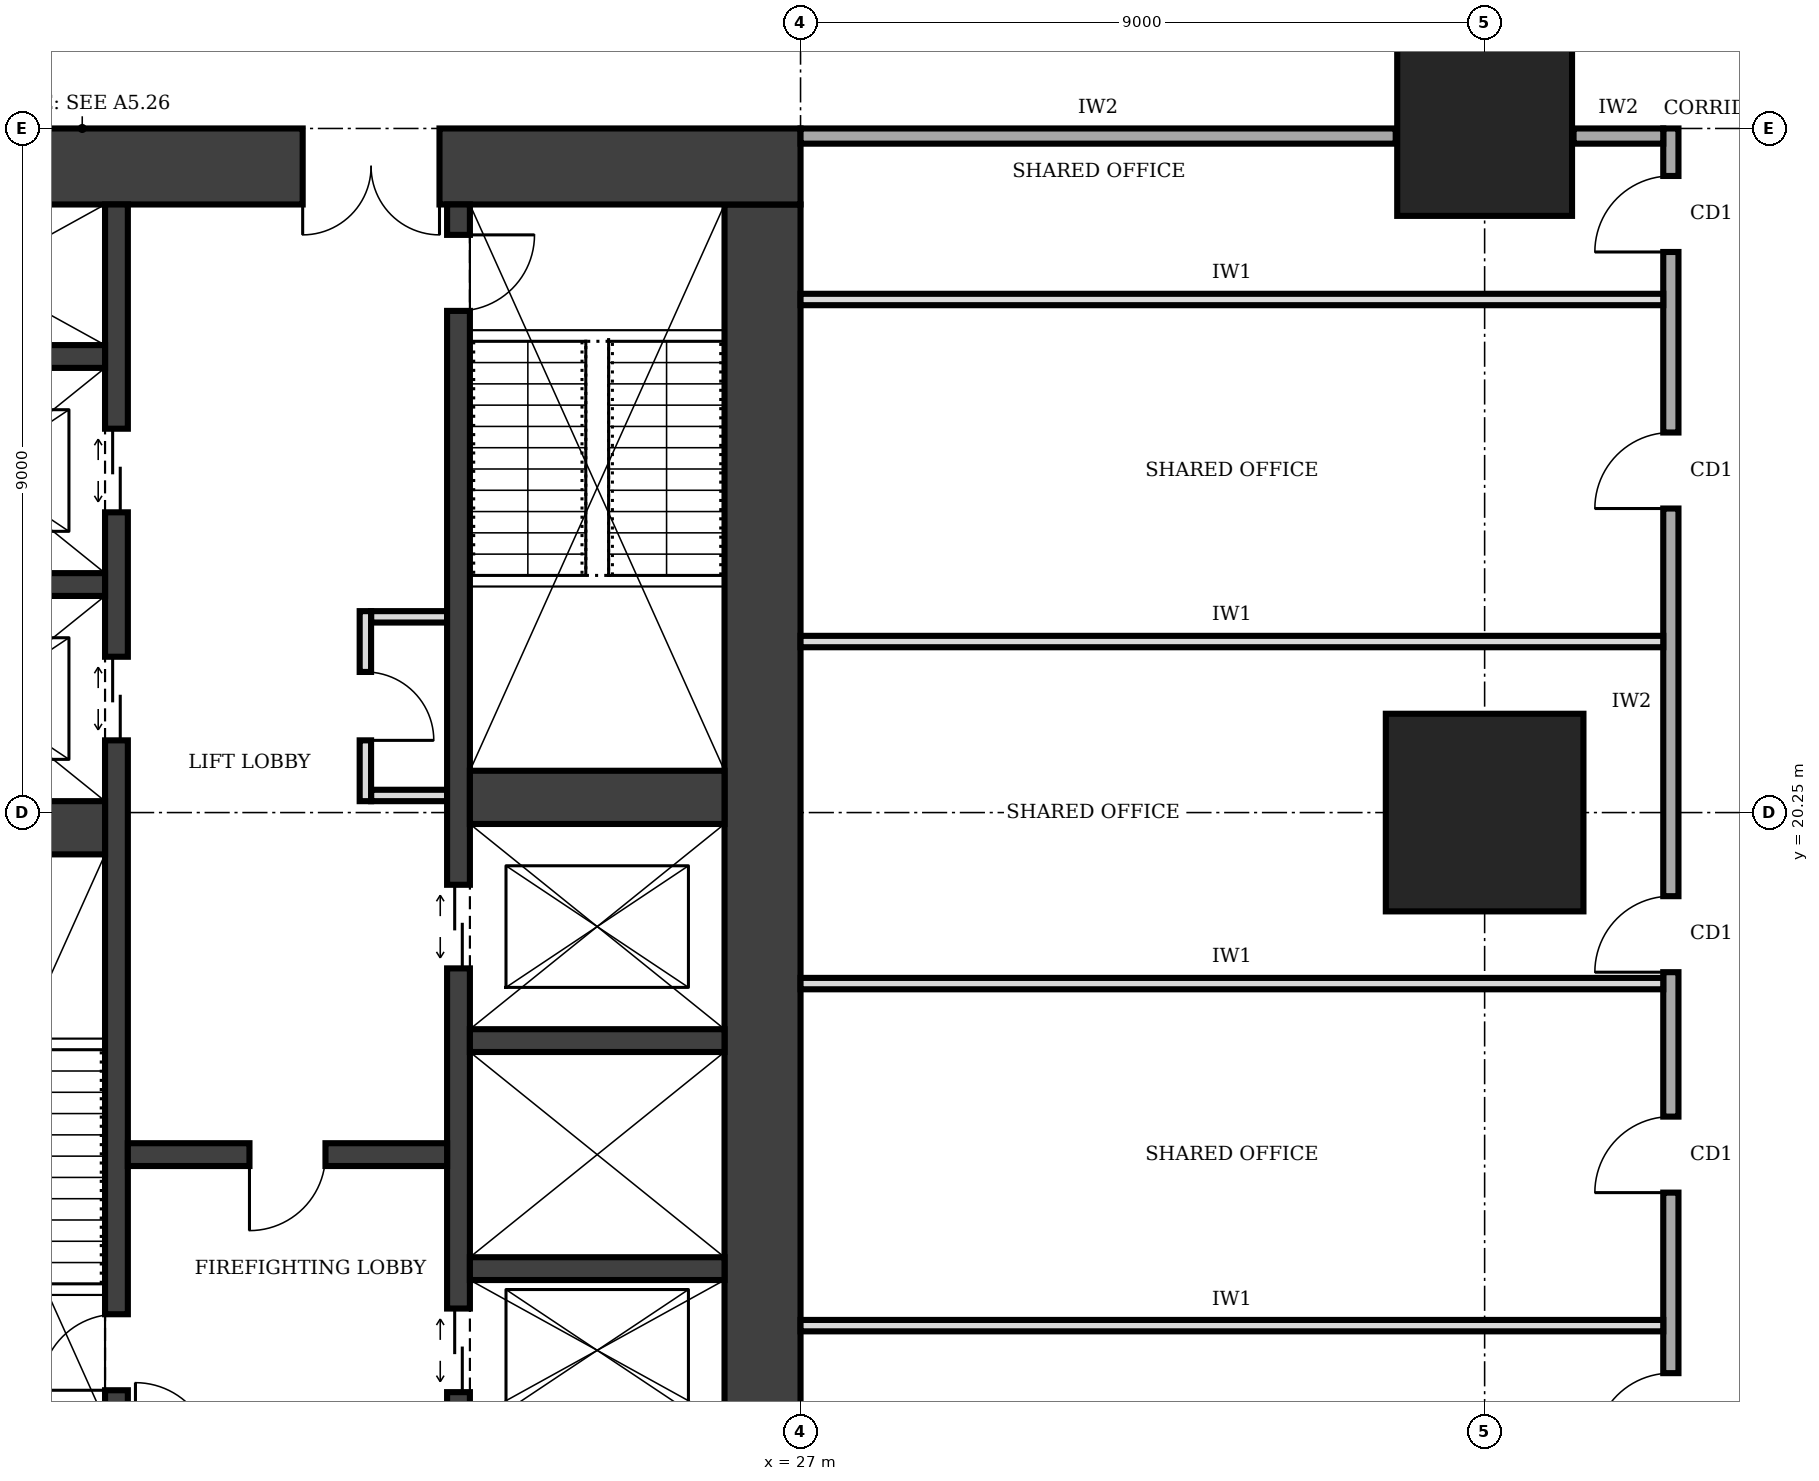
"""IFC4 building model, lengths in metres.
Left out: names, types, materials, properties, quantities, classifications, styles, units other than length and angle.
Written with IfcOpenShell. Run it as: python <this file> out.ifc"""

import sys

from ifc_helpers import new_model, si_unit, direction, frame, frame_2d, origin, origin_2d, place, context, subcontext, project, spatial, rectangle, extrude, element, fill, save


model = new_model("IFC4")
c1 = context("Model", 3, precision=1e-05, world=origin(), true_north=direction((0.0, 1.0)))
c2 = subcontext(c1, "Body", "Model", "MODEL_VIEW")
j1 = project(units=[si_unit("LENGTHUNIT", "METRE"), si_unit("PLANEANGLEUNIT", "RADIAN")], contexts=[c1])
p1 = place(None, origin())
s1 = spatial("IfcSite", under=j1, at=p1, CompositionType="ELEMENT")
p2 = place(p1, origin())
s2 = spatial("IfcBuilding", under=s1, at=p2, CompositionType="ELEMENT")
p3 = place(p2, frame((0.0, 0.0, 89.0)))
s3 = spatial("IfcBuildingStorey", under=s2, at=p3, CompositionType="ELEMENT", Elevation=89.0)
p4 = place(p3, frame((26.5, 12.25, 0.0), z_axis=(0.0, 0.0, 1.0), x_axis=(0.0, 1.0, 0.0)))
e1 = element("IfcWall", 1, at=p4, inside=s3, PredefinedType="SHEAR", context=c2, shape_type="SweptSolid", body=[
    extrude(rectangle(XDim=16.0, YDim=1.0, at=frame_2d((8.0, 0.0))), origin(), (0.0, 0.0, 1.0), 4.0),
])
p5 = place(p3, frame((27.0, 28.75, 0.0), z_axis=(0.0, 0.0, 1.0), x_axis=(-1.0, 0.0, 0.0)))
e2 = element("IfcWall", 2, at=p5, inside=s3, PredefinedType="SHEAR", context=c2, shape_type="SweptSolid", body=[
    extrude(rectangle(XDim=13.5, YDim=1.0, at=frame_2d((6.75, 0.0))), origin(), (0.0, 0.0, 1.0), 4.0),
])
p6 = place(p5, frame((4.75, 0.0, 0.0)))
e3 = element("IfcOpeningElement", 3, at=p6, cuts=e2, PredefinedType="OPENING", context=c2, shape_type="SweptSolid", body=[
    extrude(rectangle(XDim=1.8, YDim=2.1, at=frame_2d((0.9, 1.05))), frame((0.0, 0.51, 0.0), z_axis=(0.0, -1.0, 0.0), x_axis=(1.0, 0.0, 0.0)), (0.0, 0.0, 1.0), 1.02),
])
p7 = place(p3, frame((18.0, 12.25, 0.0), z_axis=(0.0, 0.0, 1.0), x_axis=(0.0, 1.0, 0.0)))
e4 = element("IfcWall", 4, at=p7, inside=s3, PredefinedType="SHEAR", context=c2, shape_type="SweptSolid", body=[
    extrude(rectangle(XDim=16.0, YDim=0.3, at=frame_2d((8.0, 0.0))), origin(), (0.0, 0.0, 1.0), 4.0),
])
p8 = place(p7, frame((0.4, 0.0, 0.0)))
e5 = element("IfcOpeningElement", 5, at=p8, cuts=e4, PredefinedType="OPENING", context=c2, shape_type="SweptSolid", body=[
    extrude(rectangle(XDim=1.0, YDim=2.1, at=frame_2d((0.5, 1.05))), frame((0.0, 0.16, 0.0), z_axis=(0.0, -1.0, 0.0), x_axis=(1.0, 0.0, 0.0)), (0.0, 0.0, 1.0), 0.32),
])
p9 = place(p7, frame((8.95, 0.0, 0.0)))
e6 = element("IfcOpeningElement", 6, at=p9, cuts=e4, PredefinedType="OPENING", context=c2, shape_type="SweptSolid", body=[
    extrude(rectangle(XDim=1.1, YDim=2.1, at=frame_2d((0.55, 1.05))), frame((0.0, 0.16, 0.0), z_axis=(0.0, -1.0, 0.0), x_axis=(1.0, 0.0, 0.0)), (0.0, 0.0, 1.0), 0.32),
])
p10 = place(p7, frame((11.95, 0.0, 0.0)))
e7 = element("IfcOpeningElement", 7, at=p10, cuts=e4, PredefinedType="OPENING", context=c2, shape_type="SweptSolid", body=[
    extrude(rectangle(XDim=1.1, YDim=2.1, at=frame_2d((0.55, 1.05))), frame((0.0, 0.16, 0.0), z_axis=(0.0, -1.0, 0.0), x_axis=(1.0, 0.0, 0.0)), (0.0, 0.0, 1.0), 0.32),
])
p11 = place(p3, frame((22.5, 12.25, 0.0), z_axis=(0.0, 0.0, 1.0), x_axis=(0.0, 1.0, 0.0)))
e8 = element("IfcWall", 8, at=p11, inside=s3, PredefinedType="SHEAR", context=c2, shape_type="SweptSolid", body=[
    extrude(rectangle(XDim=16.0, YDim=0.3, at=frame_2d((8.0, 0.0))), origin(), (0.0, 0.0, 1.0), 4.0),
])
p12 = place(p11, frame((14.6, 0.0, 0.0)))
e9 = element("IfcOpeningElement", 9, at=p12, cuts=e8, PredefinedType="OPENING", context=c2, shape_type="SweptSolid", body=[
    extrude(rectangle(XDim=1.0, YDim=2.1, at=frame_2d((0.5, 1.05))), frame((0.0, 0.16, 0.0), z_axis=(0.0, -1.0, 0.0), x_axis=(1.0, 0.0, 0.0)), (0.0, 0.0, 1.0), 0.32),
])
p13 = place(p11, frame((0.375, 0.0, 0.0)))
e10 = element("IfcOpeningElement", 10, at=p13, cuts=e8, PredefinedType="OPENING", context=c2, shape_type="SweptSolid", body=[
    extrude(rectangle(XDim=1.1, YDim=2.1, at=frame_2d((0.55, 1.05))), frame((0.0, 0.16, 0.0), z_axis=(0.0, -1.0, 0.0), x_axis=(1.0, 0.0, 0.0)), (0.0, 0.0, 1.0), 0.32),
])
p14 = place(p11, frame((5.95, 0.0, 0.0)))
e11 = element("IfcOpeningElement", 11, at=p14, cuts=e8, PredefinedType="OPENING", context=c2, shape_type="SweptSolid", body=[
    extrude(rectangle(XDim=1.1, YDim=2.1, at=frame_2d((0.55, 1.05))), frame((0.0, 0.16, 0.0), z_axis=(0.0, -1.0, 0.0), x_axis=(1.0, 0.0, 0.0)), (0.0, 0.0, 1.0), 0.32),
])
p15 = place(p3, frame((14.5, 20.05, 0.0), z_axis=(0.0, 0.0, 1.0), x_axis=(1.0, 0.0, 0.0)))
e12 = element("IfcWall", 12, at=p15, inside=s3, PredefinedType="SHEAR", context=c2, shape_type="SweptSolid", body=[
    extrude(rectangle(XDim=3.35, YDim=0.7, at=frame_2d((1.675, 0.0))), origin(), (0.0, 0.0, 1.0), 4.0),
])
p16 = place(p3, frame((18.15, 15.75, 0.0), z_axis=(0.0, 0.0, 1.0), x_axis=(1.0, 0.0, 0.0)))
e13 = element("IfcWall", 13, at=p16, inside=s3, PredefinedType="SHEAR", context=c2, shape_type="SweptSolid", body=[
    extrude(rectangle(XDim=4.2, YDim=0.3, at=frame_2d((2.1, 0.0))), origin(), (0.0, 0.0, 1.0), 4.0),
])
p17 = place(p16, frame((1.6, 0.0, 0.0)))
e14 = element("IfcOpeningElement", 14, at=p17, cuts=e13, PredefinedType="OPENING", context=c2, shape_type="SweptSolid", body=[
    extrude(rectangle(XDim=1.0, YDim=2.1, at=frame_2d((0.5, 1.05))), frame((0.0, 0.16, 0.0), z_axis=(0.0, -1.0, 0.0), x_axis=(1.0, 0.0, 0.0)), (0.0, 0.0, 1.0), 0.32),
])
for number, where, z_axis, x_axis in (
    (15, (22.65, 14.25, 0.0), (0.0, 0.0, 1.0), (1.0, 0.0, 0.0)),
    (16, (22.65, 17.25, 0.0), (0.0, 0.0, 1.0), (1.0, 0.0, 0.0)),
):
    element("IfcWall", number, at=place(p3, frame(where, z_axis=z_axis, x_axis=x_axis)), inside=s3, PredefinedType="SHEAR", context=c2, shape_type="SweptSolid", body=[
        extrude(rectangle(XDim=3.35, YDim=0.3, at=frame_2d((1.675, 0.0))), origin(), (0.0, 0.0, 1.0), 4.0),
    ])
p18 = place(p3, frame((22.65, 20.45, 0.0), z_axis=(0.0, 0.0, 1.0), x_axis=(1.0, 0.0, 0.0)))
e17 = element("IfcWall", 17, at=p18, inside=s3, PredefinedType="SHEAR", context=c2, shape_type="SweptSolid", body=[
    extrude(rectangle(XDim=3.35, YDim=0.7, at=frame_2d((1.675, 0.0))), origin(), (0.0, 0.0, 1.0), 4.0),
])
for number, where, z_axis, x_axis in (
    (18, (14.5, 23.25, 0.0), (0.0, 0.0, 1.0), (1.0, 0.0, 0.0)),
    (19, (14.5, 26.25, 0.0), (0.0, 0.0, 1.0), (1.0, 0.0, 0.0)),
):
    element("IfcWall", number, at=place(p3, frame(where, z_axis=z_axis, x_axis=x_axis)), inside=s3, PredefinedType="SHEAR", context=c2, shape_type="SweptSolid", body=[
        extrude(rectangle(XDim=3.35, YDim=0.3, at=frame_2d((1.675, 0.0))), origin(), (0.0, 0.0, 1.0), 4.0),
    ])
p19 = place(p3, frame((36.0, 20.25, 0.0), z_axis=(0.0, 0.0, 1.0), x_axis=(1.0, 0.0, 0.0)))
e20 = element("IfcColumn", 20, at=p19, inside=s3, PredefinedType="COLUMN", context=c2, shape_type="SweptSolid", body=[
    extrude(rectangle(XDim=2.6, YDim=2.6, at=origin_2d()), origin(), (0.0, 0.0, 1.0), 4.0),
])
p20 = place(p3, frame((36.0, 29.25, 0.0), z_axis=(0.0, 0.0, 1.0), x_axis=(1.0, 0.0, 0.0)))
e21 = element("IfcColumn", 21, at=p20, inside=s3, PredefinedType="COLUMN", context=c2, shape_type="SweptSolid", body=[
    extrude(rectangle(XDim=2.3, YDim=2.3, at=origin_2d()), origin(), (0.0, 0.0, 1.0), 4.0),
])
p21 = place(p3, frame((21.275, 20.4, 0.0), z_axis=(0.0, 0.0, 1.0), x_axis=(0.0, 1.0, 0.0)))
e22 = element("IfcWall", 22, at=p21, inside=s3, PredefinedType="PARTITIONING", context=c2, shape_type="SweptSolid", body=[
    extrude(rectangle(XDim=2.5, YDim=0.15, at=frame_2d((1.25, 0.0))), origin(), (0.0, 0.0, 1.0), 3.75),
])
p22 = place(p21, frame((0.8, 0.0, 0.0)))
e23 = element("IfcOpeningElement", 23, at=p22, cuts=e22, PredefinedType="OPENING", context=c2, shape_type="SweptSolid", body=[
    extrude(rectangle(XDim=0.9, YDim=2.1, at=frame_2d((0.45, 1.05))), frame((0.0, 0.085, 0.0), z_axis=(0.0, -1.0, 0.0), x_axis=(1.0, 0.0, 0.0)), (0.0, 0.0, 1.0), 0.17),
])
for number, where, z_axis, x_axis in (
    (24, (21.35, 20.475, 0.0), (0.0, 0.0, 1.0), (1.0, 0.0, 0.0)),
    (25, (21.35, 22.825, 0.0), (0.0, 0.0, 1.0), (1.0, 0.0, 0.0)),
):
    element("IfcWall", number, at=place(p3, frame(where, z_axis=z_axis, x_axis=x_axis)), inside=s3, PredefinedType="PARTITIONING", context=c2, shape_type="SweptSolid", body=[
        extrude(rectangle(XDim=1.0, YDim=0.15, at=frame_2d((0.5, 0.0))), origin(), (0.0, 0.0, 1.0), 3.75),
    ])
p23 = place(p3, frame((38.45, 11.25, 0.0), z_axis=(0.0, 0.0, 1.0), x_axis=(0.0, 1.0, 0.0)))
e26 = element("IfcWall", 26, at=p23, inside=s3, PredefinedType="SOLIDWALL", context=c2, shape_type="SweptSolid", body=[
    extrude(rectangle(XDim=18.0, YDim=0.2, at=frame_2d((9.0, 0.0))), origin(), (0.0, 0.0, 1.0), 3.75),
])
p24 = place(p23, frame((0.625, 0.0, 0.0)))
e27 = element("IfcOpeningElement", 27, at=p24, cuts=e26, PredefinedType="OPENING", context=c2, shape_type="SweptSolid", body=[
    extrude(rectangle(XDim=1.0, YDim=2.1, at=frame_2d((0.5, 1.05))), frame((0.0, 0.11, 0.0), z_axis=(0.0, -1.0, 0.0), x_axis=(1.0, 0.0, 0.0)), (0.0, 0.0, 1.0), 0.22),
])
p25 = place(p23, frame((4.0, 0.0, 0.0)))
e28 = element("IfcOpeningElement", 28, at=p25, cuts=e26, PredefinedType="OPENING", context=c2, shape_type="SweptSolid", body=[
    extrude(rectangle(XDim=1.0, YDim=2.1, at=frame_2d((0.5, 1.05))), frame((0.0, 0.11, 0.0), z_axis=(0.0, -1.0, 0.0), x_axis=(1.0, 0.0, 0.0)), (0.0, 0.0, 1.0), 0.22),
])
p26 = place(p23, frame((6.9, 0.0, 0.0)))
e29 = element("IfcOpeningElement", 29, at=p26, cuts=e26, PredefinedType="OPENING", context=c2, shape_type="SweptSolid", body=[
    extrude(rectangle(XDim=1.0, YDim=2.1, at=frame_2d((0.5, 1.05))), frame((0.0, 0.11, 0.0), z_axis=(0.0, -1.0, 0.0), x_axis=(1.0, 0.0, 0.0)), (0.0, 0.0, 1.0), 0.22),
])
p27 = place(p23, frame((13.0, 0.0, 0.0)))
e30 = element("IfcOpeningElement", 30, at=p27, cuts=e26, PredefinedType="OPENING", context=c2, shape_type="SweptSolid", body=[
    extrude(rectangle(XDim=1.0, YDim=2.1, at=frame_2d((0.5, 1.05))), frame((0.0, 0.11, 0.0), z_axis=(0.0, -1.0, 0.0), x_axis=(1.0, 0.0, 0.0)), (0.0, 0.0, 1.0), 0.22),
])
p28 = place(p23, frame((16.375, 0.0, 0.0)))
e31 = element("IfcOpeningElement", 31, at=p28, cuts=e26, PredefinedType="OPENING", context=c2, shape_type="SweptSolid", body=[
    extrude(rectangle(XDim=1.0, YDim=2.1, at=frame_2d((0.5, 1.05))), frame((0.0, 0.11, 0.0), z_axis=(0.0, -1.0, 0.0), x_axis=(1.0, 0.0, 0.0)), (0.0, 0.0, 1.0), 0.22),
])
p29 = place(p3, frame((27.0, 29.15, 0.0), z_axis=(0.0, 0.0, 1.0), x_axis=(1.0, 0.0, 0.0)))
e32 = element("IfcWall", 32, at=p29, inside=s3, PredefinedType="SOLIDWALL", context=c2, shape_type="SweptSolid", body=[
    extrude(rectangle(XDim=7.83, YDim=0.2, at=frame_2d((3.915, 0.0))), origin(), (0.0, 0.0, 1.0), 2.85),
])
p30 = place(p3, frame((37.17, 29.15, 0.0), z_axis=(0.0, 0.0, 1.0), x_axis=(1.0, 0.0, 0.0)))
e33 = element("IfcWall", 33, at=p30, inside=s3, PredefinedType="SOLIDWALL", context=c2, shape_type="SweptSolid", body=[
    extrude(rectangle(XDim=1.18, YDim=0.2, at=frame_2d((0.59, 0.0))), origin(), (0.0, 0.0, 1.0), 2.85),
])
for number, where, z_axis, x_axis in (
    (34, (27.0, 13.5, 0.0), (0.0, 0.0, 1.0), (1.0, 0.0, 0.0)),
    (35, (27.0, 18.0, 0.0), (0.0, 0.0, 1.0), (1.0, 0.0, 0.0)),
    (36, (27.0, 22.5, 0.0), (0.0, 0.0, 1.0), (1.0, 0.0, 0.0)),
    (37, (27.0, 27.0, 0.0), (0.0, 0.0, 1.0), (1.0, 0.0, 0.0)),
):
    element("IfcWall", number, at=place(p3, frame(where, z_axis=z_axis, x_axis=x_axis)), inside=s3, PredefinedType="PARTITIONING", context=c2, shape_type="SweptSolid", body=[
        extrude(rectangle(XDim=11.35, YDim=0.15, at=frame_2d((5.675, 0.0))), origin(), (0.0, 0.0, 1.0), 3.75),
    ])
p31 = place(p6, origin())
e38 = element("IfcDoor", 38, at=p31, inside=s3, OperationType="DOUBLE_DOOR_SINGLE_SWING", PredefinedType="DOOR", context=c2, shape_type="SweptSolid", body=[
    extrude(rectangle(XDim=1.8, YDim=2.1, at=frame_2d((0.9, 1.05))), frame((0.0, 0.025, 0.0), z_axis=(0.0, -1.0, 0.0), x_axis=(1.0, 0.0, 0.0)), (0.0, 0.0, 1.0), 0.05),
])
fill(e3, e38)
p32 = place(p17, frame((1.0, 0.0, 0.0), z_axis=(0.0, 0.0, 1.0), x_axis=(-1.0, 0.0, 0.0)))
e39 = element("IfcDoor", 39, at=p32, inside=s3, OperationType="SINGLE_SWING_RIGHT", PredefinedType="DOOR", context=c2, shape_type="SweptSolid", body=[
    extrude(rectangle(XDim=1.0, YDim=2.1, at=frame_2d((0.5, 1.05))), frame((0.0, 0.025, 0.0), z_axis=(0.0, -1.0, 0.0), x_axis=(1.0, 0.0, 0.0)), (0.0, 0.0, 1.0), 0.05),
])
fill(e14, e39)
p33 = place(p8, origin())
e40 = element("IfcDoor", 40, at=p33, inside=s3, OperationType="SINGLE_SWING_LEFT", PredefinedType="DOOR", context=c2, shape_type="SweptSolid", body=[
    extrude(rectangle(XDim=1.0, YDim=2.1, at=frame_2d((0.5, 1.05))), frame((0.0, 0.025, 0.0), z_axis=(0.0, -1.0, 0.0), x_axis=(1.0, 0.0, 0.0)), (0.0, 0.0, 1.0), 0.05),
])
fill(e5, e40)
p34 = place(p12, frame((1.0, 0.0, 0.0), z_axis=(0.0, 0.0, 1.0), x_axis=(-1.0, 0.0, 0.0)))
e41 = element("IfcDoor", 41, at=p34, inside=s3, OperationType="SINGLE_SWING_LEFT", PredefinedType="DOOR", context=c2, shape_type="SweptSolid", body=[
    extrude(rectangle(XDim=1.0, YDim=2.1, at=frame_2d((0.5, 1.05))), frame((0.0, 0.025, 0.0), z_axis=(0.0, -1.0, 0.0), x_axis=(1.0, 0.0, 0.0)), (0.0, 0.0, 1.0), 0.05),
])
fill(e9, e41)
p35 = place(p13, origin())
e42 = element("IfcDoor", 42, at=p35, inside=s3, OperationType="DOUBLE_DOOR_SLIDING", PredefinedType="DOOR", context=c2, shape_type="SweptSolid", body=[
    extrude(rectangle(XDim=1.1, YDim=2.1, at=frame_2d((0.55, 1.05))), frame((0.0, 0.025, 0.0), z_axis=(0.0, -1.0, 0.0), x_axis=(1.0, 0.0, 0.0)), (0.0, 0.0, 1.0), 0.05),
])
fill(e10, e42)
p36 = place(p9, origin())
e43 = element("IfcDoor", 43, at=p36, inside=s3, OperationType="DOUBLE_DOOR_SLIDING", PredefinedType="DOOR", context=c2, shape_type="SweptSolid", body=[
    extrude(rectangle(XDim=1.1, YDim=2.1, at=frame_2d((0.55, 1.05))), frame((0.0, 0.025, 0.0), z_axis=(0.0, -1.0, 0.0), x_axis=(1.0, 0.0, 0.0)), (0.0, 0.0, 1.0), 0.05),
])
fill(e6, e43)
p37 = place(p10, origin())
e44 = element("IfcDoor", 44, at=p37, inside=s3, OperationType="DOUBLE_DOOR_SLIDING", PredefinedType="DOOR", context=c2, shape_type="SweptSolid", body=[
    extrude(rectangle(XDim=1.1, YDim=2.1, at=frame_2d((0.55, 1.05))), frame((0.0, 0.025, 0.0), z_axis=(0.0, -1.0, 0.0), x_axis=(1.0, 0.0, 0.0)), (0.0, 0.0, 1.0), 0.05),
])
fill(e7, e44)
p38 = place(p14, origin())
e45 = element("IfcDoor", 45, at=p38, inside=s3, OperationType="DOUBLE_DOOR_SLIDING", PredefinedType="DOOR", context=c2, shape_type="SweptSolid", body=[
    extrude(rectangle(XDim=1.1, YDim=2.1, at=frame_2d((0.55, 1.05))), frame((0.0, 0.025, 0.0), z_axis=(0.0, -1.0, 0.0), x_axis=(1.0, 0.0, 0.0)), (0.0, 0.0, 1.0), 0.05),
])
fill(e11, e45)
p39 = place(p22, frame((0.9, 0.0, 0.0), z_axis=(0.0, 0.0, 1.0), x_axis=(-1.0, 0.0, 0.0)))
e46 = element("IfcDoor", 46, at=p39, inside=s3, OperationType="SINGLE_SWING_RIGHT", PredefinedType="DOOR", context=c2, shape_type="SweptSolid", body=[
    extrude(rectangle(XDim=0.9, YDim=2.1, at=frame_2d((0.45, 1.05))), frame((0.0, 0.025, 0.0), z_axis=(0.0, -1.0, 0.0), x_axis=(1.0, 0.0, 0.0)), (0.0, 0.0, 1.0), 0.05),
])
fill(e23, e46)
p40 = place(p24, origin())
e47 = element("IfcDoor", 47, at=p40, inside=s3, OperationType="SINGLE_SWING_LEFT", PredefinedType="DOOR", context=c2, shape_type="SweptSolid", body=[
    extrude(rectangle(XDim=1.0, YDim=2.1, at=frame_2d((0.5, 1.05))), frame((0.0, 0.025, 0.0), z_axis=(0.0, -1.0, 0.0), x_axis=(1.0, 0.0, 0.0)), (0.0, 0.0, 1.0), 0.05),
])
fill(e27, e47)
p41 = place(p25, origin())
e48 = element("IfcDoor", 48, at=p41, inside=s3, OperationType="SINGLE_SWING_LEFT", PredefinedType="DOOR", context=c2, shape_type="SweptSolid", body=[
    extrude(rectangle(XDim=1.0, YDim=2.1, at=frame_2d((0.5, 1.05))), frame((0.0, 0.025, 0.0), z_axis=(0.0, -1.0, 0.0), x_axis=(1.0, 0.0, 0.0)), (0.0, 0.0, 1.0), 0.05),
])
fill(e28, e48)
p42 = place(p26, origin())
e49 = element("IfcDoor", 49, at=p42, inside=s3, OperationType="SINGLE_SWING_LEFT", PredefinedType="DOOR", context=c2, shape_type="SweptSolid", body=[
    extrude(rectangle(XDim=1.0, YDim=2.1, at=frame_2d((0.5, 1.05))), frame((0.0, 0.025, 0.0), z_axis=(0.0, -1.0, 0.0), x_axis=(1.0, 0.0, 0.0)), (0.0, 0.0, 1.0), 0.05),
])
fill(e29, e49)
p43 = place(p27, origin())
e50 = element("IfcDoor", 50, at=p43, inside=s3, OperationType="SINGLE_SWING_LEFT", PredefinedType="DOOR", context=c2, shape_type="SweptSolid", body=[
    extrude(rectangle(XDim=1.0, YDim=2.1, at=frame_2d((0.5, 1.05))), frame((0.0, 0.025, 0.0), z_axis=(0.0, -1.0, 0.0), x_axis=(1.0, 0.0, 0.0)), (0.0, 0.0, 1.0), 0.05),
])
fill(e30, e50)
p44 = place(p28, origin())
e51 = element("IfcDoor", 51, at=p44, inside=s3, OperationType="SINGLE_SWING_LEFT", PredefinedType="DOOR", context=c2, shape_type="SweptSolid", body=[
    extrude(rectangle(XDim=1.0, YDim=2.1, at=frame_2d((0.5, 1.05))), frame((0.0, 0.025, 0.0), z_axis=(0.0, -1.0, 0.0), x_axis=(1.0, 0.0, 0.0)), (0.0, 0.0, 1.0), 0.05),
])
fill(e31, e51)
save(model, sys.argv[1])
